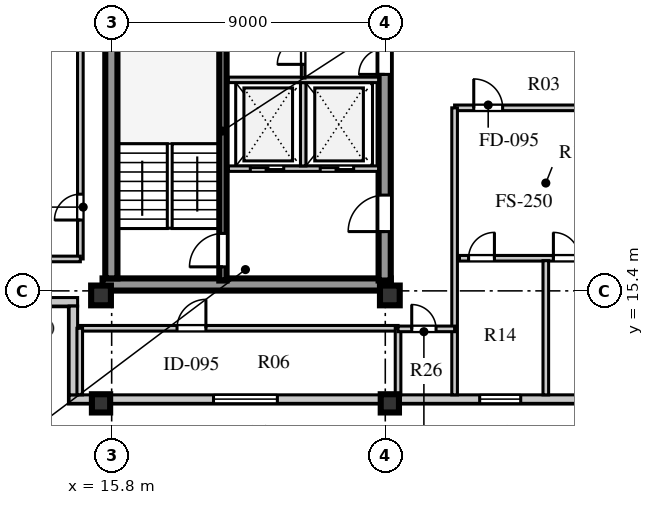
"""IFC4 building model, lengths in metres.
Left out: names, types, materials, properties, quantities, classifications, styles, units other than length and angle.
Written with IfcOpenShell. Run it as: python <this file> out.ifc"""

import sys

from ifc_helpers import new_model, si_unit, direction, frame, frame_2d, origin, origin_2d, place, context, subcontext, project, spatial, rectangle, extrude, element, fill, save


model = new_model("IFC4")
c1 = context("Model", 3, precision=1e-05, world=origin(), true_north=direction((0.0, 1.0)))
c2 = subcontext(c1, "Body", "Model", "MODEL_VIEW")
j1 = project(units=[si_unit("LENGTHUNIT", "METRE"), si_unit("PLANEANGLEUNIT", "RADIAN")], contexts=[c1])
p1 = place(None, origin())
s1 = spatial("IfcSite", under=j1, at=p1, CompositionType="ELEMENT")
p2 = place(p1, origin())
s2 = spatial("IfcBuilding", under=s1, at=p2, CompositionType="ELEMENT")
p3 = place(p2, frame((0.0, 0.0, 342.9)))
s3 = spatial("IfcBuildingStorey", under=s2, at=p3, CompositionType="ELEMENT", Elevation=342.9)
p4 = place(p3, frame((15.5, 15.61, 0.0), z_axis=(0.0, 0.0, 1.0), x_axis=(1.0, 0.0, 0.0)))
e1 = element("IfcWall", 1, at=p4, inside=s3, PredefinedType="SHEAR", context=c2, shape_type="SweptSolid", body=[
    extrude(rectangle(XDim=9.48, YDim=0.4, at=frame_2d((4.74, 0.0))), origin(), (0.0, 0.0, 1.0), 3.55),
])
p5 = place(p3, frame((15.79, 15.81, 0.0), z_axis=(0.0, 0.0, 1.0), x_axis=(0.0, 1.0, 0.0)))
e2 = element("IfcWall", 2, at=p5, inside=s3, PredefinedType="SHEAR", context=c2, shape_type="SweptSolid", body=[
    extrude(rectangle(XDim=25.63, YDim=0.4, at=frame_2d((12.815, 0.0))), origin(), (0.0, 0.0, 1.0), 3.55),
])
p6 = place(p3, frame((24.78, 15.74, 0.0), z_axis=(0.0, 0.0, 1.0), x_axis=(0.0, 1.0, 0.0)))
e3 = element("IfcWall", 3, at=p6, inside=s3, PredefinedType="SHEAR", context=c2, shape_type="SweptSolid", body=[
    extrude(rectangle(XDim=25.76, YDim=0.4, at=frame_2d((12.88, 0.0))), origin(), (0.0, 0.0, 1.0), 3.55),
])
p7 = place(p6, frame((1.61, 0.0, 0.0)))
e4 = element("IfcOpeningElement", 4, at=p7, cuts=e3, PredefinedType="OPENING", context=c2, shape_type="SweptSolid", body=[
    extrude(rectangle(XDim=1.2, YDim=2.1, at=frame_2d((0.6, 1.05))), frame((0.0, 0.21, 0.0), z_axis=(0.0, -1.0, 0.0), x_axis=(1.0, 0.0, 0.0)), (0.0, 0.0, 1.0), 0.42),
])
p8 = place(p6, frame((6.78, 0.0, 0.0)))
e5 = element("IfcOpeningElement", 5, at=p8, cuts=e3, PredefinedType="OPENING", context=c2, shape_type="SweptSolid", body=[
    extrude(rectangle(XDim=0.85, YDim=2.06, at=frame_2d((0.425, 1.03))), frame((0.0, 0.21, 0.0), z_axis=(0.0, -1.0, 0.0), x_axis=(1.0, 0.0, 0.0)), (0.0, 0.0, 1.0), 0.42),
])
p9 = place(p6, frame((12.11, 0.0, 0.0)))
e6 = element("IfcOpeningElement", 6, at=p9, cuts=e3, PredefinedType="OPENING", context=c2, shape_type="SweptSolid", body=[
    extrude(rectangle(XDim=1.5, YDim=2.12, at=frame_2d((0.75, 1.06))), frame((0.0, 0.21, 0.0), z_axis=(0.0, -1.0, 0.0), x_axis=(1.0, 0.0, 0.0)), (0.0, 0.0, 1.0), 0.42),
])
p10 = place(p6, frame((20.11, 0.0, 0.0)))
e7 = element("IfcOpeningElement", 7, at=p10, cuts=e3, PredefinedType="OPENING", context=c2, shape_type="SweptSolid", body=[
    extrude(rectangle(XDim=1.2, YDim=2.12, at=frame_2d((0.6, 1.06))), frame((0.0, 0.21, 0.0), z_axis=(0.0, -1.0, 0.0), x_axis=(1.0, 0.0, 0.0)), (0.0, 0.0, 1.0), 0.42),
])
p11 = place(p6, frame((24.01, 0.0, 0.0)))
e8 = element("IfcOpeningElement", 8, at=p11, cuts=e3, PredefinedType="OPENING", context=c2, shape_type="SweptSolid", body=[
    extrude(rectangle(XDim=0.95, YDim=2.1, at=frame_2d((0.475, 1.05))), frame((0.0, 0.21, 0.0), z_axis=(0.0, -1.0, 0.0), x_axis=(1.0, 0.0, 0.0)), (0.0, 0.0, 1.0), 0.42),
])
for number, where, z_axis, x_axis in (
    (9, (15.45, 15.25, 0.0), (0.0, 0.0, 1.0), (1.0, 0.0, 0.0)),
    (10, (24.95, 15.25, 0.0), (0.0, 0.0, 1.0), (1.0, 0.0, 0.0)),
):
    element("IfcColumn", number, at=place(p3, frame(where, z_axis=z_axis, x_axis=x_axis)), inside=s3, PredefinedType="COLUMN", context=c2, shape_type="SweptSolid", body=[
        extrude(rectangle(XDim=0.65, YDim=0.65, at=origin_2d()), origin(), (0.0, 0.0, 1.0), 3.55),
    ])
for number, where, z_axis, x_axis in (
    (11, (15.45, 11.7, 0.0), (0.0, 0.0, 1.0), (1.0, 0.0, 0.0)),
    (12, (24.95, 11.7, 0.0), (0.0, 0.0, 1.0), (1.0, 0.0, 0.0)),
):
    element("IfcColumn", number, at=place(p3, frame(where, z_axis=z_axis, x_axis=x_axis)), inside=s3, PredefinedType="COLUMN", context=c2, shape_type="SweptSolid", body=[
        extrude(rectangle(XDim=0.6, YDim=0.6, at=origin_2d()), origin(), (0.0, 0.0, 1.0), 3.55),
    ])
p12 = place(p3, frame((14.4, 11.84, 0.0), z_axis=(0.0, 0.0, 1.0), x_axis=(1.0, 0.0, 0.0)))
e13 = element("IfcWall", 13, at=p12, inside=s3, PredefinedType="STANDARD", context=c2, shape_type="SweptSolid", body=[
    extrude(rectangle(XDim=25.2, YDim=0.28, at=frame_2d((12.6, 0.0))), origin(), (0.0, 0.0, 1.0), 2.91),
])
p13 = place(p12, frame((4.75, 0.0, 0.8)))
e14 = element("IfcOpeningElement", 14, at=p13, cuts=e13, PredefinedType="OPENING", context=c2, shape_type="SweptSolid", body=[
    extrude(rectangle(XDim=2.1, YDim=1.95, at=frame_2d((1.05, 0.975))), frame((0.0, 0.15, 0.0), z_axis=(0.0, -1.0, 0.0), x_axis=(1.0, 0.0, 0.0)), (0.0, 0.0, 1.0), 0.3),
])
p14 = place(p12, frame((13.505, 0.0, 0.8)))
e15 = element("IfcOpeningElement", 15, at=p14, cuts=e13, PredefinedType="OPENING", context=c2, shape_type="SweptSolid", body=[
    extrude(rectangle(XDim=1.35, YDim=1.9, at=frame_2d((0.675, 0.95))), frame((0.0, 0.15, 0.0), z_axis=(0.0, -1.0, 0.0), x_axis=(1.0, 0.0, 0.0)), (0.0, 0.0, 1.0), 0.3),
])
p15 = place(p12, frame((16.715, 0.0, 0.8)))
e16 = element("IfcOpeningElement", 16, at=p15, cuts=e13, PredefinedType="OPENING", context=c2, shape_type="SweptSolid", body=[
    extrude(rectangle(XDim=1.65, YDim=1.95, at=frame_2d((0.825, 0.975))), frame((0.0, 0.15, 0.0), z_axis=(0.0, -1.0, 0.0), x_axis=(1.0, 0.0, 0.0)), (0.0, 0.0, 1.0), 0.3),
])
p16 = place(p12, frame((21.39, 0.0, 0.8)))
e17 = element("IfcOpeningElement", 17, at=p16, cuts=e13, PredefinedType="OPENING", context=c2, shape_type="SweptSolid", body=[
    extrude(rectangle(XDim=1.95, YDim=2.0, at=frame_2d((0.975, 1.0))), frame((0.0, 0.15, 0.0), z_axis=(0.0, -1.0, 0.0), x_axis=(1.0, 0.0, 0.0)), (0.0, 0.0, 1.0), 0.3),
])
p17 = place(p3, frame((11.2, 15.04, 0.0), z_axis=(0.0, 0.0, 1.0), x_axis=(1.0, 0.0, 0.0)))
e18 = element("IfcWall", 18, at=p17, inside=s3, PredefinedType="STANDARD", context=c2, shape_type="SweptSolid", body=[
    extrude(rectangle(XDim=3.48, YDim=0.28, at=frame_2d((1.74, 0.0))), origin(), (0.0, 0.0, 1.0), 2.91),
])
p18 = place(p3, frame((14.54, 14.9, 0.0), z_axis=(0.0, 0.0, 1.0), x_axis=(0.0, -1.0, 0.0)))
e19 = element("IfcWall", 19, at=p18, inside=s3, PredefinedType="STANDARD", context=c2, shape_type="SweptSolid", body=[
    extrude(rectangle(XDim=2.92, YDim=0.28, at=frame_2d((1.46, 0.0))), origin(), (0.0, 0.0, 1.0), 2.91),
])
p19 = place(p3, frame((19.46, 15.74, 0.0), z_axis=(0.0, 0.0, 1.0), x_axis=(0.0, 1.0, 0.0)))
e20 = element("IfcWall", 20, at=p19, inside=s3, PredefinedType="SHEAR", context=c2, shape_type="SweptSolid", body=[
    extrude(rectangle(XDim=8.2, YDim=0.24, at=frame_2d((4.1, 0.0))), origin(), (0.0, 0.0, 1.0), 3.8),
])
p20 = place(p19, frame((0.45, 0.0, 0.0)))
e21 = element("IfcOpeningElement", 21, at=p20, cuts=e20, PredefinedType="OPENING", context=c2, shape_type="SweptSolid", body=[
    extrude(rectangle(XDim=1.1, YDim=2.1, at=frame_2d((0.55, 1.05))), frame((0.0, 0.13, 0.0), z_axis=(0.0, -1.0, 0.0), x_axis=(1.0, 0.0, 0.0)), (0.0, 0.0, 1.0), 0.26),
])
p21 = place(p3, frame((19.64, 19.42, 0.0), z_axis=(0.0, 0.0, 1.0), x_axis=(1.0, 0.0, 0.0)))
e22 = element("IfcWall", 22, at=p21, inside=s3, PredefinedType="SOLIDWALL", context=c2, shape_type="SweptSolid", body=[
    extrude(rectangle(XDim=4.94, YDim=0.18, at=frame_2d((2.47, 0.0))), origin(), (0.0, 0.0, 1.0), 3.55),
])
p22 = place(p21, frame((0.72, 0.0, 0.0)))
e23 = element("IfcOpeningElement", 23, at=p22, cuts=e22, PredefinedType="OPENING", context=c2, shape_type="SweptSolid", body=[
    extrude(rectangle(XDim=1.1, YDim=2.1, at=frame_2d((0.55, 1.05))), frame((0.0, 0.1, 0.0), z_axis=(0.0, -1.0, 0.0), x_axis=(1.0, 0.0, 0.0)), (0.0, 0.0, 1.0), 0.2),
])
p23 = place(p21, frame((3.02, 0.0, 0.0)))
e24 = element("IfcOpeningElement", 24, at=p23, cuts=e22, PredefinedType="OPENING", context=c2, shape_type="SweptSolid", body=[
    extrude(rectangle(XDim=1.1, YDim=2.1, at=frame_2d((0.55, 1.05))), frame((0.0, 0.1, 0.0), z_axis=(0.0, -1.0, 0.0), x_axis=(1.0, 0.0, 0.0)), (0.0, 0.0, 1.0), 0.2),
])
p24 = place(p3, frame((22.1, 19.51, 0.0), z_axis=(0.0, 0.0, 1.0), x_axis=(0.0, 1.0, 0.0)))
e25 = element("IfcWall", 25, at=p24, inside=s3, PredefinedType="SOLIDWALL", context=c2, shape_type="SweptSolid", body=[
    extrude(rectangle(XDim=2.74, YDim=0.18, at=frame_2d((1.37, 0.0))), origin(), (0.0, 0.0, 1.0), 3.55),
])
p25 = place(p3, frame((19.64, 22.34, 0.0), z_axis=(0.0, 0.0, 1.0), x_axis=(1.0, 0.0, 0.0)))
e26 = element("IfcWall", 26, at=p25, inside=s3, PredefinedType="SOLIDWALL", context=c2, shape_type="SweptSolid", body=[
    extrude(rectangle(XDim=4.94, YDim=0.18, at=frame_2d((2.47, 0.0))), origin(), (0.0, 0.0, 1.0), 3.55),
])
p26 = place(p3, frame((22.1, 22.4, 0.0), z_axis=(0.0, 0.0, 1.0), x_axis=(0.0, 1.0, 0.0)))
e27 = element("IfcWall", 27, at=p26, inside=s3, PredefinedType="PARTITIONING", context=c2, shape_type="SweptSolid", body=[
    extrude(rectangle(XDim=1.88, YDim=0.12, at=frame_2d((0.94, 0.0))), origin(), (0.0, 0.0, 1.0), 3.55),
])
p27 = place(p26, frame((0.45, 0.0, 0.0)))
e28 = element("IfcOpeningElement", 28, at=p27, cuts=e27, PredefinedType="OPENING", context=c2, shape_type="SweptSolid", body=[
    extrude(rectangle(XDim=0.85, YDim=2.06, at=frame_2d((0.425, 1.03))), frame((0.0, 0.07, 0.0), z_axis=(0.0, -1.0, 0.0), x_axis=(1.0, 0.0, 0.0)), (0.0, 0.0, 1.0), 0.14),
])
p28 = place(p3, frame((27.08, 21.42, 0.0), z_axis=(0.0, 0.0, 1.0), x_axis=(1.0, 0.0, 0.0)))
e29 = element("IfcWall", 29, at=p28, inside=s3, PredefinedType="SOLIDWALL", context=c2, shape_type="SweptSolid", body=[
    extrude(rectangle(XDim=8.17, YDim=0.185, at=frame_2d((4.085, 0.0))), origin(), (0.0, 0.0, 1.0), 3.25),
])
p29 = place(p28, frame((0.63, 0.0, 0.0)))
e30 = element("IfcOpeningElement", 30, at=p29, cuts=e29, PredefinedType="OPENING", context=c2, shape_type="SweptSolid", body=[
    extrude(rectangle(XDim=0.95, YDim=2.1, at=frame_2d((0.475, 1.05))), frame((0.0, 0.103, 0.0), z_axis=(0.0, -1.0, 0.0), x_axis=(1.0, 0.0, 0.0)), (0.0, 0.0, 1.0), 0.205),
])
p30 = place(p3, frame((27.08, 11.98, 0.0), z_axis=(0.0, 0.0, 1.0), x_axis=(0.0, 1.0, 0.0)))
e31 = element("IfcWall", 31, at=p30, inside=s3, PredefinedType="SOLIDWALL", context=c2, shape_type="SweptSolid", body=[
    extrude(rectangle(XDim=9.44, YDim=0.185, at=frame_2d((4.72, 0.0))), origin(), (0.0, 0.0, 1.0), 3.55),
])
p31 = place(p3, frame((14.75, 14.17, 0.0), z_axis=(0.0, 0.0, 1.0), x_axis=(1.0, 0.0, 0.0)))
e32 = element("IfcWall", 32, at=p31, inside=s3, PredefinedType="SOLIDWALL", context=c2, shape_type="SweptSolid", body=[
    extrude(rectangle(XDim=10.47, YDim=0.185, at=frame_2d((5.235, 0.0))), origin(), (0.0, 0.0, 1.0), 3.55),
])
p32 = place(p31, frame((3.2, 0.0, 0.0)))
e33 = element("IfcOpeningElement", 33, at=p32, cuts=e32, PredefinedType="OPENING", context=c2, shape_type="SweptSolid", body=[
    extrude(rectangle(XDim=0.95, YDim=2.08, at=frame_2d((0.475, 1.04))), frame((0.0, 0.103, 0.0), z_axis=(0.0, -1.0, 0.0), x_axis=(1.0, 0.0, 0.0)), (0.0, 0.0, 1.0), 0.205),
])
p33 = place(p3, frame((14.75, 11.98, 0.0), z_axis=(0.0, 0.0, 1.0), x_axis=(0.0, 1.0, 0.0)))
e34 = element("IfcWall", 34, at=p33, inside=s3, PredefinedType="SOLIDWALL", context=c2, shape_type="SweptSolid", body=[
    extrude(rectangle(XDim=2.19, YDim=0.185, at=frame_2d((1.095, 0.0))), origin(), (0.0, 0.0, 1.0), 3.55),
])
p34 = place(p3, frame((25.22, 11.98, 0.0), z_axis=(0.0, 0.0, 1.0), x_axis=(0.0, 1.0, 0.0)))
e35 = element("IfcWall", 35, at=p34, inside=s3, PredefinedType="SOLIDWALL", context=c2, shape_type="SweptSolid", body=[
    extrude(rectangle(XDim=2.19, YDim=0.185, at=frame_2d((1.095, 0.0))), origin(), (0.0, 0.0, 1.0), 3.1),
])
p35 = place(p3, frame((14.77, 16.45, 0.0), z_axis=(0.0, 0.0, 1.0), x_axis=(0.0, 1.0, 0.0)))
e36 = element("IfcWall", 36, at=p35, inside=s3, PredefinedType="SOLIDWALL", context=c2, shape_type="SweptSolid", body=[
    extrude(rectangle(XDim=24.3, YDim=0.185, at=frame_2d((12.15, 0.0))), origin(), (0.0, 0.0, 1.0), 3.55),
])
p36 = place(p35, frame((1.28, 0.0, 0.0)))
e37 = element("IfcOpeningElement", 37, at=p36, cuts=e36, PredefinedType="OPENING", context=c2, shape_type="SweptSolid", body=[
    extrude(rectangle(XDim=0.85, YDim=2.08, at=frame_2d((0.425, 1.04))), frame((0.0, 0.103, 0.0), z_axis=(0.0, -1.0, 0.0), x_axis=(1.0, 0.0, 0.0)), (0.0, 0.0, 1.0), 0.205),
])
p37 = place(p35, frame((9.31, 0.0, 0.0)))
e38 = element("IfcOpeningElement", 38, at=p37, cuts=e36, PredefinedType="OPENING", context=c2, shape_type="SweptSolid", body=[
    extrude(rectangle(XDim=0.85, YDim=2.08, at=frame_2d((0.425, 1.04))), frame((0.0, 0.103, 0.0), z_axis=(0.0, -1.0, 0.0), x_axis=(1.0, 0.0, 0.0)), (0.0, 0.0, 1.0), 0.205),
])
p38 = place(p35, frame((17.71, 0.0, 0.0)))
e39 = element("IfcOpeningElement", 39, at=p38, cuts=e36, PredefinedType="OPENING", context=c2, shape_type="SweptSolid", body=[
    extrude(rectangle(XDim=0.85, YDim=2.08, at=frame_2d((0.425, 1.04))), frame((0.0, 0.103, 0.0), z_axis=(0.0, -1.0, 0.0), x_axis=(1.0, 0.0, 0.0)), (0.0, 0.0, 1.0), 0.205),
])
p39 = place(p3, frame((11.48, 16.45, 0.0), z_axis=(0.0, 0.0, 1.0), x_axis=(1.0, 0.0, 0.0)))
e40 = element("IfcWall", 40, at=p39, inside=s3, PredefinedType="SOLIDWALL", context=c2, shape_type="SweptSolid", body=[
    extrude(rectangle(XDim=3.29, YDim=0.185, at=frame_2d((1.645, 0.0))), origin(), (0.0, 0.0, 1.0), 3.55),
])
p40 = place(p3, frame((27.24, 16.473, 0.0), z_axis=(0.0, 0.0, 1.0), x_axis=(1.0, 0.0, 0.0)))
e41 = element("IfcWall", 41, at=p40, inside=s3, PredefinedType="SOLIDWALL", context=c2, shape_type="SweptSolid", body=[
    extrude(rectangle(XDim=8.16, YDim=0.185, at=frame_2d((4.08, 0.0))), origin(), (0.0, 0.0, 1.0), 3.55),
])
p41 = place(p40, frame((0.3, 0.0, 0.0)))
e42 = element("IfcOpeningElement", 42, at=p41, cuts=e41, PredefinedType="OPENING", context=c2, shape_type="SweptSolid", body=[
    extrude(rectangle(XDim=0.85, YDim=2.08, at=frame_2d((0.425, 1.04))), frame((0.0, 0.103, 0.0), z_axis=(0.0, -1.0, 0.0), x_axis=(1.0, 0.0, 0.0)), (0.0, 0.0, 1.0), 0.205),
])
p42 = place(p40, frame((3.09, 0.0, 0.0)))
e43 = element("IfcOpeningElement", 43, at=p42, cuts=e41, PredefinedType="OPENING", context=c2, shape_type="SweptSolid", body=[
    extrude(rectangle(XDim=0.85, YDim=2.08, at=frame_2d((0.425, 1.04))), frame((0.0, 0.103, 0.0), z_axis=(0.0, -1.0, 0.0), x_axis=(1.0, 0.0, 0.0)), (0.0, 0.0, 1.0), 0.205),
])
p43 = place(p3, frame((30.08, 11.98, 0.0), z_axis=(0.0, 0.0, 1.0), x_axis=(0.0, 1.0, 0.0)))
e44 = element("IfcWall", 44, at=p43, inside=s3, PredefinedType="SOLIDWALL", context=c2, shape_type="SweptSolid", body=[
    extrude(rectangle(XDim=4.413, YDim=0.185, at=frame_2d((2.207, 0.0))), origin(), (0.0, 0.0, 1.0), 3.55),
])
p44 = place(p3, frame((25.22, 14.15, 0.0), z_axis=(0.0, 0.0, 1.0), x_axis=(1.0, 0.0, 0.0)))
e45 = element("IfcWall", 45, at=p44, inside=s3, PredefinedType="SOLIDWALL", context=c2, shape_type="SweptSolid", body=[
    extrude(rectangle(XDim=1.86, YDim=0.185, at=frame_2d((0.93, 0.0))), origin(), (0.0, 0.0, 1.0), 3.55),
])
p45 = place(p44, frame((0.45, 0.0, 0.0)))
e46 = element("IfcOpeningElement", 46, at=p45, cuts=e45, PredefinedType="OPENING", context=c2, shape_type="SweptSolid", body=[
    extrude(rectangle(XDim=0.8, YDim=2.05, at=frame_2d((0.4, 1.025))), frame((0.0, 0.103, 0.0), z_axis=(0.0, -1.0, 0.0), x_axis=(1.0, 0.0, 0.0)), (0.0, 0.0, 1.0), 0.205),
])
p46 = place(p13, origin())
e47 = element("IfcWindow", 47, at=p46, inside=s3, PartitioningType="SINGLE_PANEL", PredefinedType="WINDOW", context=c2, shape_type="SweptSolid", body=[
    extrude(rectangle(XDim=2.1, YDim=1.95, at=frame_2d((1.05, 0.975))), frame((0.0, 0.03, 0.0), z_axis=(0.0, -1.0, 0.0), x_axis=(1.0, 0.0, 0.0)), (0.0, 0.0, 1.0), 0.06),
])
fill(e14, e47)
p47 = place(p14, origin())
e48 = element("IfcWindow", 48, at=p47, inside=s3, PartitioningType="SINGLE_PANEL", PredefinedType="WINDOW", context=c2, shape_type="SweptSolid", body=[
    extrude(rectangle(XDim=1.35, YDim=1.9, at=frame_2d((0.675, 0.95))), frame((0.0, 0.03, 0.0), z_axis=(0.0, -1.0, 0.0), x_axis=(1.0, 0.0, 0.0)), (0.0, 0.0, 1.0), 0.06),
])
fill(e15, e48)
p48 = place(p20, origin())
e49 = element("IfcDoor", 49, at=p48, inside=s3, OperationType="SINGLE_SWING_LEFT", PredefinedType="DOOR", context=c2, shape_type="SweptSolid", body=[
    extrude(rectangle(XDim=1.1, YDim=2.1, at=frame_2d((0.55, 1.05))), frame((0.0, 0.025, 0.0), z_axis=(0.0, -1.0, 0.0), x_axis=(1.0, 0.0, 0.0)), (0.0, 0.0, 1.0), 0.05),
])
fill(e21, e49)
p49 = place(p22, origin())
e50 = element("IfcDoor", 50, at=p49, inside=s3, OperationType="DOUBLE_DOOR_SLIDING", PredefinedType="DOOR", context=c2, shape_type="SweptSolid", body=[
    extrude(rectangle(XDim=1.1, YDim=2.1, at=frame_2d((0.55, 1.05))), frame((0.0, 0.025, 0.0), z_axis=(0.0, -1.0, 0.0), x_axis=(1.0, 0.0, 0.0)), (0.0, 0.0, 1.0), 0.05),
])
fill(e23, e50)
p50 = place(p23, origin())
e51 = element("IfcDoor", 51, at=p50, inside=s3, OperationType="DOUBLE_DOOR_SLIDING", PredefinedType="DOOR", context=c2, shape_type="SweptSolid", body=[
    extrude(rectangle(XDim=1.1, YDim=2.1, at=frame_2d((0.55, 1.05))), frame((0.0, 0.025, 0.0), z_axis=(0.0, -1.0, 0.0), x_axis=(1.0, 0.0, 0.0)), (0.0, 0.0, 1.0), 0.05),
])
fill(e24, e51)
p51 = place(p7, frame((1.2, 0.0, 0.0), z_axis=(0.0, 0.0, 1.0), x_axis=(-1.0, 0.0, 0.0)))
e52 = element("IfcDoor", 52, at=p51, inside=s3, OperationType="SINGLE_SWING_RIGHT", PredefinedType="DOOR", context=c2, shape_type="SweptSolid", body=[
    extrude(rectangle(XDim=1.2, YDim=2.1, at=frame_2d((0.6, 1.05))), frame((0.0, 0.025, 0.0), z_axis=(0.0, -1.0, 0.0), x_axis=(1.0, 0.0, 0.0)), (0.0, 0.0, 1.0), 0.05),
])
fill(e4, e52)
p52 = place(p27, origin())
e53 = element("IfcDoor", 53, at=p52, inside=s3, OperationType="SINGLE_SWING_LEFT", PredefinedType="DOOR", context=c2, shape_type="SweptSolid", body=[
    extrude(rectangle(XDim=0.85, YDim=2.06, at=frame_2d((0.425, 1.03))), frame((0.0, 0.025, 0.0), z_axis=(0.0, -1.0, 0.0), x_axis=(1.0, 0.0, 0.0)), (0.0, 0.0, 1.0), 0.05),
])
fill(e28, e53)
p53 = place(p8, frame((0.85, 0.0, 0.0), z_axis=(0.0, 0.0, 1.0), x_axis=(-1.0, 0.0, 0.0)))
e54 = element("IfcDoor", 54, at=p53, inside=s3, OperationType="SINGLE_SWING_RIGHT", PredefinedType="DOOR", context=c2, shape_type="SweptSolid", body=[
    extrude(rectangle(XDim=0.85, YDim=2.06, at=frame_2d((0.425, 1.03))), frame((0.0, 0.025, 0.0), z_axis=(0.0, -1.0, 0.0), x_axis=(1.0, 0.0, 0.0)), (0.0, 0.0, 1.0), 0.05),
])
fill(e5, e54)
p54 = place(p32, frame((0.95, 0.0, 0.0), z_axis=(0.0, 0.0, 1.0), x_axis=(-1.0, 0.0, 0.0)))
e55 = element("IfcDoor", 55, at=p54, inside=s3, OperationType="SINGLE_SWING_LEFT", PredefinedType="DOOR", context=c2, shape_type="SweptSolid", body=[
    extrude(rectangle(XDim=0.95, YDim=2.08, at=frame_2d((0.475, 1.04))), frame((0.0, 0.025, 0.0), z_axis=(0.0, -1.0, 0.0), x_axis=(1.0, 0.0, 0.0)), (0.0, 0.0, 1.0), 0.05),
])
fill(e33, e55)
p55 = place(p36, origin())
e56 = element("IfcDoor", 56, at=p55, inside=s3, OperationType="SINGLE_SWING_LEFT", PredefinedType="DOOR", context=c2, shape_type="SweptSolid", body=[
    extrude(rectangle(XDim=0.85, YDim=2.08, at=frame_2d((0.425, 1.04))), frame((0.0, 0.025, 0.0), z_axis=(0.0, -1.0, 0.0), x_axis=(1.0, 0.0, 0.0)), (0.0, 0.0, 1.0), 0.05),
])
fill(e37, e56)
p56 = place(p41, frame((0.85, 0.0, 0.0), z_axis=(0.0, 0.0, 1.0), x_axis=(-1.0, 0.0, 0.0)))
e57 = element("IfcDoor", 57, at=p56, inside=s3, OperationType="SINGLE_SWING_LEFT", PredefinedType="DOOR", context=c2, shape_type="SweptSolid", body=[
    extrude(rectangle(XDim=0.85, YDim=2.08, at=frame_2d((0.425, 1.04))), frame((0.0, 0.025, 0.0), z_axis=(0.0, -1.0, 0.0), x_axis=(1.0, 0.0, 0.0)), (0.0, 0.0, 1.0), 0.05),
])
fill(e42, e57)
p57 = place(p42, frame((0.85, 0.0, 0.0), z_axis=(0.0, 0.0, 1.0), x_axis=(-1.0, 0.0, 0.0)))
e58 = element("IfcDoor", 58, at=p57, inside=s3, OperationType="SINGLE_SWING_RIGHT", PredefinedType="DOOR", context=c2, shape_type="SweptSolid", body=[
    extrude(rectangle(XDim=0.85, YDim=2.08, at=frame_2d((0.425, 1.04))), frame((0.0, 0.025, 0.0), z_axis=(0.0, -1.0, 0.0), x_axis=(1.0, 0.0, 0.0)), (0.0, 0.0, 1.0), 0.05),
])
fill(e43, e58)
p58 = place(p29, frame((0.95, 0.0, 0.0), z_axis=(0.0, 0.0, 1.0), x_axis=(-1.0, 0.0, 0.0)))
e59 = element("IfcDoor", 59, at=p58, inside=s3, OperationType="SINGLE_SWING_RIGHT", PredefinedType="DOOR", context=c2, shape_type="SweptSolid", body=[
    extrude(rectangle(XDim=0.95, YDim=2.1, at=frame_2d((0.475, 1.05))), frame((0.0, 0.025, 0.0), z_axis=(0.0, -1.0, 0.0), x_axis=(1.0, 0.0, 0.0)), (0.0, 0.0, 1.0), 0.05),
])
fill(e30, e59)
p59 = place(p45, origin())
e60 = element("IfcDoor", 60, at=p59, inside=s3, OperationType="SINGLE_SWING_LEFT", PredefinedType="DOOR", context=c2, shape_type="SweptSolid", body=[
    extrude(rectangle(XDim=0.8, YDim=2.05, at=frame_2d((0.4, 1.025))), frame((0.0, 0.025, 0.0), z_axis=(0.0, -1.0, 0.0), x_axis=(1.0, 0.0, 0.0)), (0.0, 0.0, 1.0), 0.05),
])
fill(e46, e60)
save(model, sys.argv[1])
